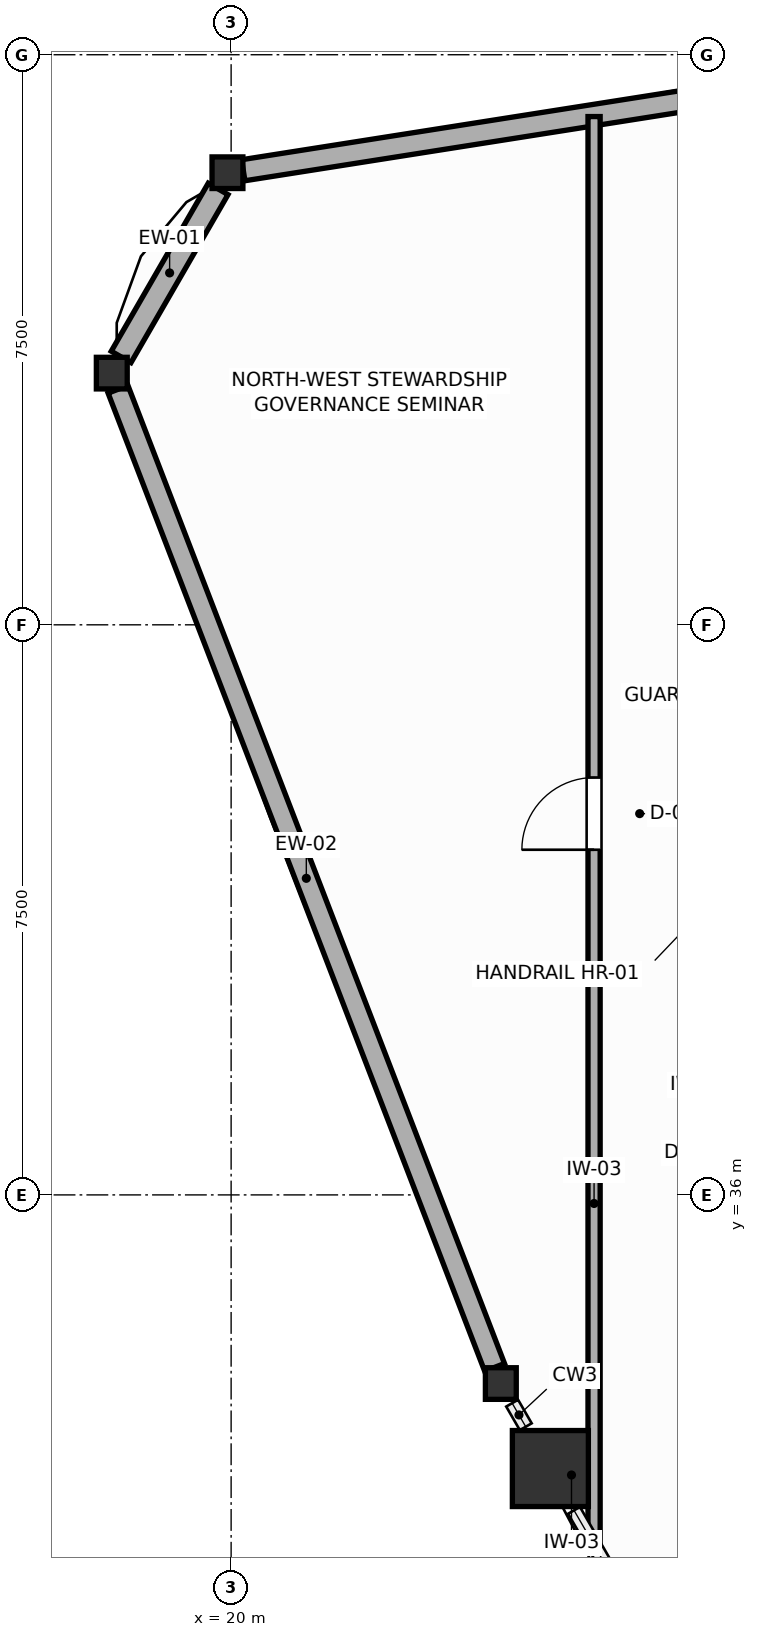
"""IFC4 building model, lengths in metres.
Left out: names, types, materials, properties, quantities, classifications, styles, units other than length and angle.
Written with IfcOpenShell. Run it as: python <this file> out.ifc"""

import sys

from ifc_helpers import new_model, si_unit, direction, frame, frame_2d, origin, origin_2d, place, context, subcontext, project, spatial, rectangle, i_section, extrude, source, transform, mapped, element, fill, save


model = new_model("IFC4")
c1 = context("Model", 3, precision=1e-05, world=origin(), true_north=direction((0.0, 1.0)))
c2 = subcontext(c1, "Body", "Model", "MODEL_VIEW")
j1 = project(units=[si_unit("LENGTHUNIT", "METRE"), si_unit("PLANEANGLEUNIT", "RADIAN")], contexts=[c1])
p1 = place(None, origin())
s1 = spatial("IfcSite", under=j1, at=p1, CompositionType="ELEMENT")
p2 = place(p1, origin())
s2 = spatial("IfcBuilding", under=s1, at=p2, CompositionType="ELEMENT")
p3 = place(p2, frame((0.0, 0.0, 213.0)))
s3 = spatial("IfcBuildingStorey", under=s2, at=p3, CompositionType="ELEMENT", Elevation=213.0)
m1 = source(origin(), c2, "Body", "SweptSolid", [
    extrude(rectangle(XDim=1.0, YDim=1.0, at=origin_2d()), origin(), (0.0, 0.0, 1.0), 3.6),
])
p4 = place(p3, frame((24.2, 32.4, 0.0), z_axis=(0.0, 0.0, 1.0), x_axis=(1.0, 0.0, 0.0)))
e1 = element("IfcColumn", 1, at=p4, inside=s3, PredefinedType="COLUMN", context=c2, shape_type="MappedRepresentation", body=[
    mapped(m1, transform((0.0, 0.0, 0.0), scale=1.0)),
])
m2 = source(origin(), c2, "Body", "SweptSolid", [
    extrude(i_section(OverallWidth=0.406, OverallDepth=0.416, WebThickness=0.027, FlangeThickness=0.044, FilletRadius=0.015, at=origin_2d()), origin(), (0.0, 0.0, 1.0), 3.6),
])
for number, where, z_axis, x_axis in (
    (2, (19.952, 49.448, 0.0), (0.0, 0.0, 1.0), (1.0, 0.0, 0.0)),
    (3, (18.43, 46.811, 0.0), (0.0, 0.0, 1.0), (1.0, 0.0, 0.0)),
    (4, (23.548, 33.518, 0.0), (0.0, 0.0, 1.0), (1.0, 0.0, 0.0)),
):
    element("IfcColumn", number, at=place(p3, frame(where, z_axis=z_axis, x_axis=x_axis)), inside=s3, PredefinedType="COLUMN", context=c2, shape_type="MappedRepresentation", body=[
        mapped(m2, transform((0.0, 0.0, 0.0), scale=1.0)),
    ])
p5 = place(p3, frame((33.815, 51.629, 0.0), z_axis=(0.0, 0.0, 1.0), x_axis=(-0.987848165878, -0.155422009936, 0.0)))
e5 = element("IfcWall", 5, at=p5, inside=s3, PredefinedType="SOLIDWALL", context=c2, shape_type="SweptSolid", body=[
    extrude(rectangle(XDim=13.823, YDim=0.28, at=frame_2d((6.912, 0.0))), origin(), (0.0, 0.0, 1.0), 1.88),
])
p6 = place(p3, frame((19.829, 49.235, 0.0), z_axis=(0.0, 0.0, 1.0), x_axis=(-0.49990462644, -0.866080460733, 0.0)))
e6 = element("IfcWall", 6, at=p6, inside=s3, PredefinedType="SOLIDWALL", context=c2, shape_type="SweptSolid", body=[
    extrude(rectangle(XDim=2.552, YDim=0.3, at=frame_2d((1.276, 0.0))), origin(), (0.0, 0.0, 1.0), 1.88),
])
p7 = place(p3, frame((18.512, 46.598, 0.0), z_axis=(0.0, 0.0, 1.0), x_axis=(0.359321962573, -0.933213655715, 0.0)))
e7 = element("IfcWall", 7, at=p7, inside=s3, PredefinedType="SOLIDWALL", context=c2, shape_type="SweptSolid", body=[
    extrude(rectangle(XDim=13.788, YDim=0.28, at=frame_2d((6.894, 0.0))), origin(), (0.0, 0.0, 1.0), 1.88),
])
p8 = place(p3, frame((24.775, 31.413, 0.0), z_axis=(0.0, 0.0, 1.0), x_axis=(0.0, 1.0, 0.0)))
e8 = element("IfcWall", 8, at=p8, inside=s3, PredefinedType="PARTITIONING", context=c2, shape_type="SweptSolid", body=[
    extrude(rectangle(XDim=18.773, YDim=0.16, at=frame_2d((9.387, 0.0))), origin(), (0.0, 0.0, 1.0), 3.41),
])
p9 = place(p8, frame((9.127, 0.0, 0.0)))
e9 = element("IfcOpeningElement", 9, at=p9, cuts=e8, PredefinedType="OPENING", context=c2, shape_type="SweptSolid", body=[
    extrude(rectangle(XDim=0.95, YDim=2.05, at=frame_2d((0.475, 1.025))), frame((0.0, 0.09, 0.0), z_axis=(0.0, -1.0, 0.0), x_axis=(1.0, 0.0, 0.0)), (0.0, 0.0, 1.0), 0.18),
])
p10 = place(p3, frame((24.263, 32.315, 0.0), z_axis=(0.0, 0.0, 1.0), x_axis=(1.0, 0.0, 0.0)))
e10 = element("IfcWall", 10, at=p10, inside=s3, PredefinedType="PARTITIONING", context=c2, shape_type="SweptSolid", body=[
    extrude(rectangle(XDim=0.43, YDim=0.16, at=frame_2d((0.215, 0.0))), origin(), (0.0, 0.0, 1.0), 2.17),
])
p11 = place(p9, origin())
e11 = element("IfcDoor", 11, at=p11, inside=s3, OperationType="SINGLE_SWING_LEFT", PredefinedType="DOOR", context=c2, shape_type="SweptSolid", body=[
    extrude(rectangle(XDim=0.95, YDim=2.05, at=frame_2d((0.475, 1.025))), frame((0.0, 0.025, 0.0), z_axis=(0.0, -1.0, 0.0), x_axis=(1.0, 0.0, 0.0)), (0.0, 0.0, 1.0), 0.05),
])
fill(e9, e11)
save(model, sys.argv[1])
